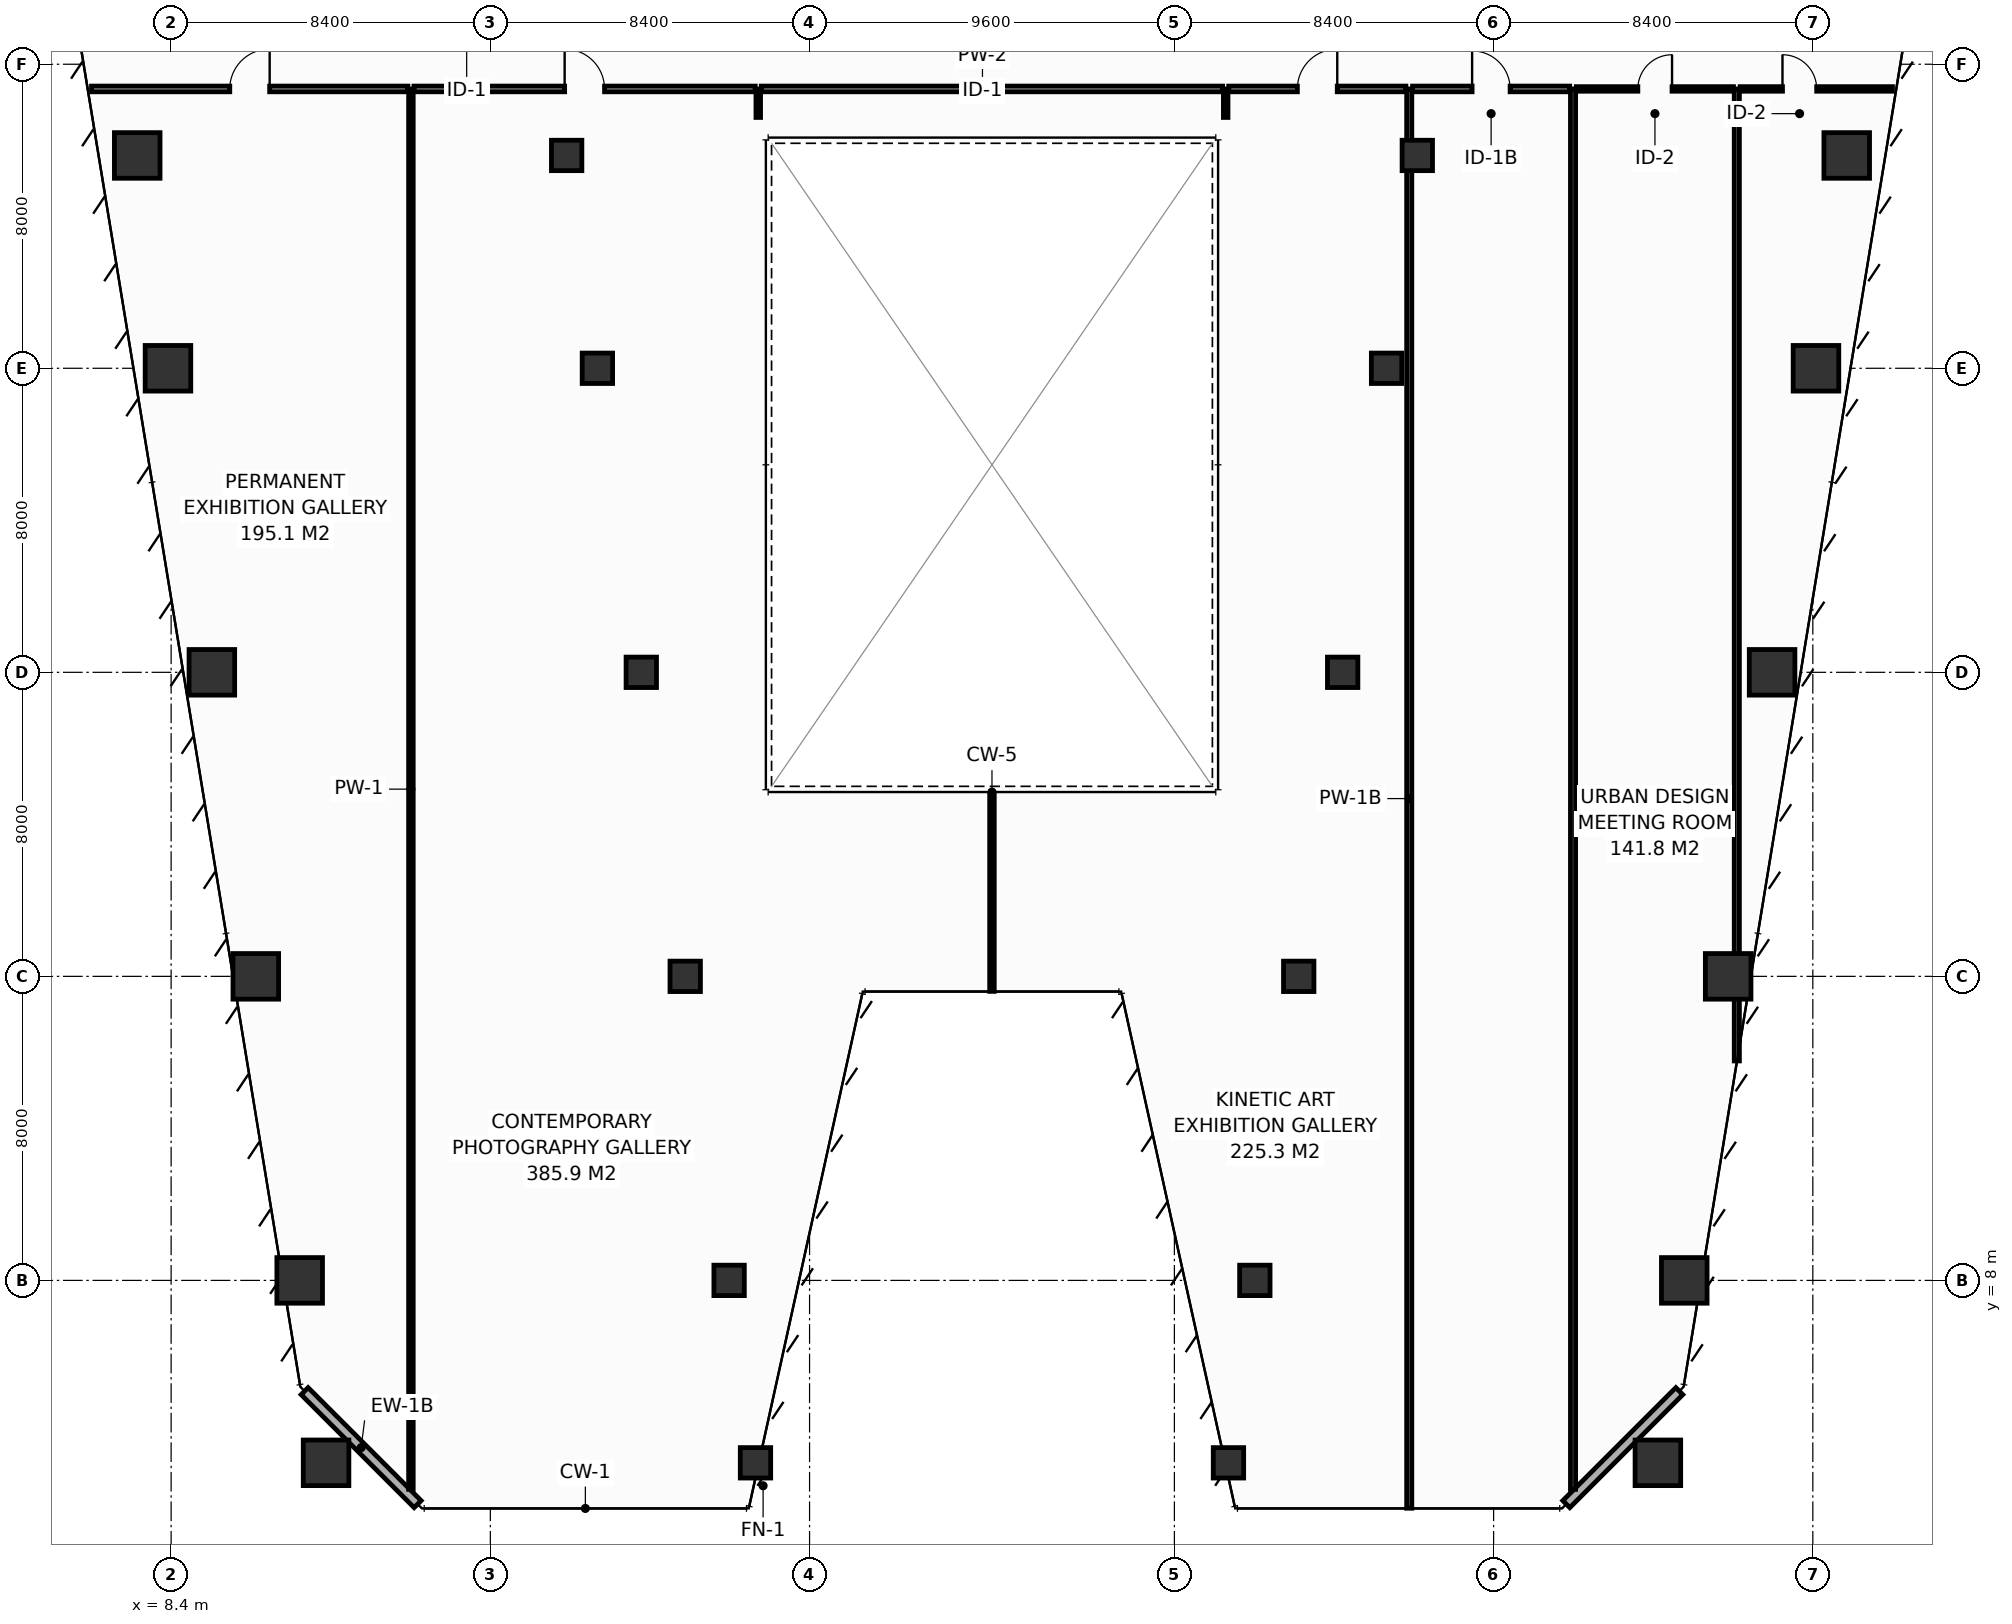
"""IFC4 building model, lengths in metres.
Left out: names, types, materials, properties, quantities, classifications, styles, units other than length and angle.
Written with IfcOpenShell. Run it as: python <this file> out.ifc"""

import sys

from ifc_helpers import new_model, si_unit, direction, frame, frame_2d, origin, origin_2d, place, context, subcontext, project, spatial, rectangle, hollow_rectangle, extrude, element, fill, save


model = new_model("IFC4")
c1 = context("Model", 3, precision=1e-05, world=origin(), true_north=direction((0.0, 1.0)))
c2 = subcontext(c1, "Body", "Model", "MODEL_VIEW")
j1 = project(units=[si_unit("LENGTHUNIT", "METRE"), si_unit("PLANEANGLEUNIT", "RADIAN")], contexts=[c1])
p1 = place(None, origin())
s1 = spatial("IfcSite", under=j1, at=p1, CompositionType="ELEMENT")
p2 = place(p1, origin())
s2 = spatial("IfcBuilding", under=s1, at=p2, CompositionType="ELEMENT")
p3 = place(p2, frame((0.0, 0.0, 60.4)))
s3 = spatial("IfcBuildingStorey", under=s2, at=p3, CompositionType="ELEMENT", Elevation=60.4)
for number, where, z_axis, x_axis in (
    (1, (12.477, 3.2, 0.0), (0.0, 0.0, 1.0), (1.0, 0.0, 0.0)),
    (2, (47.523, 3.2, 0.0), (0.0, 0.0, 1.0), (1.0, 0.0, 0.0)),
):
    element("IfcColumn", number, at=place(p3, frame(where, z_axis=z_axis, x_axis=x_axis)), inside=s3, PredefinedType="COLUMN", context=c2, shape_type="SweptSolid", body=[
        extrude(hollow_rectangle(XDim=1.2, YDim=1.2, WallThickness=0.055, at=origin_2d()), origin(), (0.0, 0.0, 1.0), 4.4),
    ])
for number, where, z_axis, x_axis in (
    (3, (23.777, 3.2, 0.0), (0.0, 0.0, 1.0), (1.0, 0.0, 0.0)),
    (4, (36.223, 3.2, 0.0), (0.0, 0.0, 1.0), (1.0, 0.0, 0.0)),
):
    element("IfcColumn", number, at=place(p3, frame(where, z_axis=z_axis, x_axis=x_axis)), inside=s3, PredefinedType="COLUMN", context=c2, shape_type="SweptSolid", body=[
        extrude(hollow_rectangle(XDim=0.8, YDim=0.8, WallThickness=0.036, at=origin_2d()), origin(), (0.0, 0.0, 1.0), 4.4),
    ])
for number, where, z_axis, x_axis in (
    (5, (11.783, 8.0, 0.0), (0.0, 0.0, 1.0), (1.0, 0.0, 0.0)),
    (6, (48.217, 8.0, 0.0), (0.0, 0.0, 1.0), (1.0, 0.0, 0.0)),
):
    element("IfcColumn", number, at=place(p3, frame(where, z_axis=z_axis, x_axis=x_axis)), inside=s3, PredefinedType="COLUMN", context=c2, shape_type="SweptSolid", body=[
        extrude(hollow_rectangle(XDim=1.2, YDim=1.2, WallThickness=0.055, at=origin_2d()), origin(), (0.0, 0.0, 1.0), 4.4),
    ])
for number, where, z_axis, x_axis in (
    (7, (23.083, 8.0, 0.0), (0.0, 0.0, 1.0), (1.0, 0.0, 0.0)),
    (8, (36.917, 8.0, 0.0), (0.0, 0.0, 1.0), (1.0, 0.0, 0.0)),
):
    element("IfcColumn", number, at=place(p3, frame(where, z_axis=z_axis, x_axis=x_axis)), inside=s3, PredefinedType="COLUMN", context=c2, shape_type="SweptSolid", body=[
        extrude(hollow_rectangle(XDim=0.8, YDim=0.8, WallThickness=0.036, at=origin_2d()), origin(), (0.0, 0.0, 1.0), 4.4),
    ])
for number, where, z_axis, x_axis in (
    (9, (10.628, 16.0, 0.0), (0.0, 0.0, 1.0), (1.0, 0.0, 0.0)),
    (10, (49.372, 16.0, 0.0), (0.0, 0.0, 1.0), (1.0, 0.0, 0.0)),
):
    element("IfcColumn", number, at=place(p3, frame(where, z_axis=z_axis, x_axis=x_axis)), inside=s3, PredefinedType="COLUMN", context=c2, shape_type="SweptSolid", body=[
        extrude(hollow_rectangle(XDim=1.2, YDim=1.2, WallThickness=0.055, at=origin_2d()), origin(), (0.0, 0.0, 1.0), 4.4),
    ])
for number, where, z_axis, x_axis in (
    (11, (21.928, 16.0, 0.0), (0.0, 0.0, 1.0), (1.0, 0.0, 0.0)),
    (12, (38.072, 16.0, 0.0), (0.0, 0.0, 1.0), (1.0, 0.0, 0.0)),
):
    element("IfcColumn", number, at=place(p3, frame(where, z_axis=z_axis, x_axis=x_axis)), inside=s3, PredefinedType="COLUMN", context=c2, shape_type="SweptSolid", body=[
        extrude(hollow_rectangle(XDim=0.8, YDim=0.8, WallThickness=0.036, at=origin_2d()), origin(), (0.0, 0.0, 1.0), 4.4),
    ])
for number, where, z_axis, x_axis in (
    (13, (9.472, 24.0, 0.0), (0.0, 0.0, 1.0), (1.0, 0.0, 0.0)),
    (14, (50.528, 24.0, 0.0), (0.0, 0.0, 1.0), (1.0, 0.0, 0.0)),
):
    element("IfcColumn", number, at=place(p3, frame(where, z_axis=z_axis, x_axis=x_axis)), inside=s3, PredefinedType="COLUMN", context=c2, shape_type="SweptSolid", body=[
        extrude(hollow_rectangle(XDim=1.2, YDim=1.2, WallThickness=0.055, at=origin_2d()), origin(), (0.0, 0.0, 1.0), 4.4),
    ])
for number, where, z_axis, x_axis in (
    (15, (20.772, 24.0, 0.0), (0.0, 0.0, 1.0), (1.0, 0.0, 0.0)),
    (16, (39.228, 24.0, 0.0), (0.0, 0.0, 1.0), (1.0, 0.0, 0.0)),
):
    element("IfcColumn", number, at=place(p3, frame(where, z_axis=z_axis, x_axis=x_axis)), inside=s3, PredefinedType="COLUMN", context=c2, shape_type="SweptSolid", body=[
        extrude(hollow_rectangle(XDim=0.8, YDim=0.8, WallThickness=0.036, at=origin_2d()), origin(), (0.0, 0.0, 1.0), 4.4),
    ])
for number, where, z_axis, x_axis in (
    (17, (8.317, 32.0, 0.0), (0.0, 0.0, 1.0), (1.0, 0.0, 0.0)),
    (18, (51.683, 32.0, 0.0), (0.0, 0.0, 1.0), (1.0, 0.0, 0.0)),
):
    element("IfcColumn", number, at=place(p3, frame(where, z_axis=z_axis, x_axis=x_axis)), inside=s3, PredefinedType="COLUMN", context=c2, shape_type="SweptSolid", body=[
        extrude(hollow_rectangle(XDim=1.2, YDim=1.2, WallThickness=0.055, at=origin_2d()), origin(), (0.0, 0.0, 1.0), 4.4),
    ])
for number, where, z_axis, x_axis in (
    (19, (19.617, 32.0, 0.0), (0.0, 0.0, 1.0), (1.0, 0.0, 0.0)),
    (20, (40.383, 32.0, 0.0), (0.0, 0.0, 1.0), (1.0, 0.0, 0.0)),
):
    element("IfcColumn", number, at=place(p3, frame(where, z_axis=z_axis, x_axis=x_axis)), inside=s3, PredefinedType="COLUMN", context=c2, shape_type="SweptSolid", body=[
        extrude(hollow_rectangle(XDim=0.8, YDim=0.8, WallThickness=0.036, at=origin_2d()), origin(), (0.0, 0.0, 1.0), 4.4),
    ])
for number, where, z_axis, x_axis in (
    (21, (7.508, 37.6, 0.0), (0.0, 0.0, 1.0), (1.0, 0.0, 0.0)),
    (22, (52.492, 37.6, 0.0), (0.0, 0.0, 1.0), (1.0, 0.0, 0.0)),
):
    element("IfcColumn", number, at=place(p3, frame(where, z_axis=z_axis, x_axis=x_axis)), inside=s3, PredefinedType="COLUMN", context=c2, shape_type="SweptSolid", body=[
        extrude(hollow_rectangle(XDim=1.2, YDim=1.2, WallThickness=0.055, at=origin_2d()), origin(), (0.0, 0.0, 1.0), 4.4),
    ])
for number, where, z_axis, x_axis in (
    (23, (18.808, 37.6, 0.0), (0.0, 0.0, 1.0), (1.0, 0.0, 0.0)),
    (24, (41.192, 37.6, 0.0), (0.0, 0.0, 1.0), (1.0, 0.0, 0.0)),
):
    element("IfcColumn", number, at=place(p3, frame(where, z_axis=z_axis, x_axis=x_axis)), inside=s3, PredefinedType="COLUMN", context=c2, shape_type="SweptSolid", body=[
        extrude(hollow_rectangle(XDim=0.8, YDim=0.8, WallThickness=0.036, at=origin_2d()), origin(), (0.0, 0.0, 1.0), 4.4),
    ])
for number, where, z_axis, x_axis in (
    (25, (11.913, 5.087, 0.0), (0.0, 0.0, 1.0), (0.707, -0.707, 0.0)),
    (26, (45.113, 2.113, 0.0), (0.0, 0.0, 1.0), (0.707, 0.707, 0.0)),
):
    element("IfcWall", number, at=place(p3, frame(where, z_axis=z_axis, x_axis=x_axis)), inside=s3, PredefinedType="STANDARD", context=c2, shape_type="SweptSolid", body=[
        extrude(rectangle(XDim=4.206, YDim=0.26, at=frame_2d((2.103, 0.0))), origin(), (0.0, 0.0, 1.0), 4.15),
    ])
p4 = place(p3, frame((14.71, 2.502, 0.0), z_axis=(0.0, 0.0, 1.0), x_axis=(0.0, 1.0, 0.0)))
e27 = element("IfcWall", 27, at=p4, inside=s3, PredefinedType="PARTITIONING", context=c2, shape_type="SweptSolid", body=[
    extrude(rectangle(XDim=36.848, YDim=0.12, at=frame_2d((18.424, 0.0))), origin(), (0.0, 0.0, 1.0), 3.335),
])
p5 = place(p3, frame((40.98, 2.005, 0.0), z_axis=(0.0, 0.0, 1.0), x_axis=(0.0, 1.0, 0.0)))
e28 = element("IfcWall", 28, at=p5, inside=s3, PredefinedType="PARTITIONING", context=c2, shape_type="SweptSolid", body=[
    extrude(rectangle(XDim=37.345, YDim=0.135, at=frame_2d((18.673, 0.0))), origin(), (0.0, 0.0, 1.0), 3.335),
])
p6 = place(p3, frame((45.29, 2.502, 0.0), z_axis=(0.0, 0.0, 1.0), x_axis=(0.0, 1.0, 0.0)))
e29 = element("IfcWall", 29, at=p6, inside=s3, PredefinedType="PARTITIONING", context=c2, shape_type="SweptSolid", body=[
    extrude(rectangle(XDim=36.848, YDim=0.135, at=frame_2d((18.424, 0.0))), origin(), (0.0, 0.0, 1.0), 3.335),
])
p7 = place(p3, frame((49.6, 13.774, 0.0), z_axis=(0.0, 0.0, 1.0), x_axis=(0.0, 1.0, 0.0)))
e30 = element("IfcWall", 30, at=p7, inside=s3, PredefinedType="PARTITIONING", context=c2, shape_type="SweptSolid", body=[
    extrude(rectangle(XDim=25.576, YDim=0.135, at=frame_2d((12.788, 0.0))), origin(), (0.0, 0.0, 1.0), 3.335),
])
for number, where, z_axis, x_axis in (
    (31, (23.85, 38.6, 0.0), (0.0, 0.0, 1.0), (0.0, 1.0, 0.0)),
    (32, (36.15, 38.6, 0.0), (0.0, 0.0, 1.0), (0.0, 1.0, 0.0)),
):
    element("IfcWall", number, at=place(p3, frame(where, z_axis=z_axis, x_axis=x_axis)), inside=s3, PredefinedType="PARTITIONING", context=c2, shape_type="SweptSolid", body=[
        extrude(rectangle(XDim=0.75, YDim=0.12, at=frame_2d((0.375, 0.0))), origin(), (0.0, 0.0, 1.0), 4.15),
    ])
p8 = place(p3, frame((30.0, 15.605, 0.0), z_axis=(0.0, 0.0, 1.0), x_axis=(0.0, 1.0, 0.0)))
e33 = element("IfcWall", 33, at=p8, inside=s3, PredefinedType="PARTITIONING", context=c2, shape_type="SweptSolid", body=[
    extrude(rectangle(XDim=5.175, YDim=0.12, at=frame_2d((2.587, 0.0))), origin(), (0.0, 0.0, 1.0), 4.15),
])
p9 = place(p3, frame((6.305, 39.35, 0.0), z_axis=(0.0, 0.0, 1.0), x_axis=(1.0, 0.0, 0.0)))
e34 = element("IfcWall", 34, at=p9, inside=s3, PredefinedType="PARTITIONING", context=c2, shape_type="SweptSolid", body=[
    extrude(rectangle(XDim=8.325, YDim=0.15, at=frame_2d((4.163, 0.0))), origin(), (0.0, 0.0, 1.0), 3.635),
])
p10 = place(p9, frame((3.638, 0.0, 0.0)))
e35 = element("IfcOpeningElement", 35, at=p10, cuts=e34, PredefinedType="OPENING", context=c2, shape_type="SweptSolid", body=[
    extrude(rectangle(XDim=1.05, YDim=2.15, at=frame_2d((0.525, 1.075))), frame((0.0, 0.085, 0.0), z_axis=(0.0, -1.0, 0.0), x_axis=(1.0, 0.0, 0.0)), (0.0, 0.0, 1.0), 0.17),
])
p11 = place(p3, frame((14.79, 39.35, 0.0), z_axis=(0.0, 0.0, 1.0), x_axis=(1.0, 0.0, 0.0)))
e36 = element("IfcWall", 36, at=p11, inside=s3, PredefinedType="PARTITIONING", context=c2, shape_type="SweptSolid", body=[
    extrude(rectangle(XDim=8.98, YDim=0.15, at=frame_2d((4.49, 0.0))), origin(), (0.0, 0.0, 1.0), 3.335),
])
p12 = place(p11, frame((3.965, 0.0, 0.0)))
e37 = element("IfcOpeningElement", 37, at=p12, cuts=e36, PredefinedType="OPENING", context=c2, shape_type="SweptSolid", body=[
    extrude(rectangle(XDim=1.05, YDim=2.15, at=frame_2d((0.525, 1.075))), frame((0.0, 0.085, 0.0), z_axis=(0.0, -1.0, 0.0), x_axis=(1.0, 0.0, 0.0)), (0.0, 0.0, 1.0), 0.17),
])
p13 = place(p3, frame((23.93, 39.35, 0.0), z_axis=(0.0, 0.0, 1.0), x_axis=(1.0, 0.0, 0.0)))
e38 = element("IfcWall", 38, at=p13, inside=s3, PredefinedType="PARTITIONING", context=c2, shape_type="SweptSolid", body=[
    extrude(rectangle(XDim=12.14, YDim=0.15, at=frame_2d((6.07, 0.0))), origin(), (0.0, 0.0, 1.0), 4.15),
])
p14 = place(p3, frame((36.23, 39.35, 0.0), z_axis=(0.0, 0.0, 1.0), x_axis=(1.0, 0.0, 0.0)))
e39 = element("IfcWall", 39, at=p14, inside=s3, PredefinedType="PARTITIONING", context=c2, shape_type="SweptSolid", body=[
    extrude(rectangle(XDim=4.663, YDim=0.15, at=frame_2d((2.331, 0.0))), origin(), (0.0, 0.0, 1.0), 3.335),
])
p15 = place(p14, frame((1.806, 0.0, 0.0)))
e40 = element("IfcOpeningElement", 40, at=p15, cuts=e39, PredefinedType="OPENING", context=c2, shape_type="SweptSolid", body=[
    extrude(rectangle(XDim=1.05, YDim=2.15, at=frame_2d((0.525, 1.075))), frame((0.0, 0.085, 0.0), z_axis=(0.0, -1.0, 0.0), x_axis=(1.0, 0.0, 0.0)), (0.0, 0.0, 1.0), 0.17),
])
p16 = place(p3, frame((41.067, 39.35, 0.0), z_axis=(0.0, 0.0, 1.0), x_axis=(1.0, 0.0, 0.0)))
e41 = element("IfcWall", 41, at=p16, inside=s3, PredefinedType="PARTITIONING", context=c2, shape_type="SweptSolid", body=[
    extrude(rectangle(XDim=4.135, YDim=0.15, at=frame_2d((2.067, 0.0))), origin(), (0.0, 0.0, 1.0), 4.15),
])
p17 = place(p16, frame((1.567, 0.0, 0.0)))
e42 = element("IfcOpeningElement", 42, at=p17, cuts=e41, PredefinedType="OPENING", context=c2, shape_type="SweptSolid", body=[
    extrude(rectangle(XDim=1.0, YDim=2.15, at=frame_2d((0.5, 1.075))), frame((0.0, 0.085, 0.0), z_axis=(0.0, -1.0, 0.0), x_axis=(1.0, 0.0, 0.0)), (0.0, 0.0, 1.0), 0.17),
])
p18 = place(p3, frame((45.377, 39.35, 0.0), z_axis=(0.0, 0.0, 1.0), x_axis=(1.0, 0.0, 0.0)))
e43 = element("IfcWall", 43, at=p18, inside=s3, PredefinedType="PARTITIONING", context=c2, shape_type="SweptSolid", body=[
    extrude(rectangle(XDim=4.135, YDim=0.12, at=frame_2d((2.067, 0.0))), origin(), (0.0, 0.0, 1.0), 4.15),
])
p19 = place(p18, frame((1.618, 0.0, 0.0)))
e44 = element("IfcOpeningElement", 44, at=p19, cuts=e43, PredefinedType="OPENING", context=c2, shape_type="SweptSolid", body=[
    extrude(rectangle(XDim=0.9, YDim=2.1, at=frame_2d((0.45, 1.05))), frame((0.0, 0.07, 0.0), z_axis=(0.0, -1.0, 0.0), x_axis=(1.0, 0.0, 0.0)), (0.0, 0.0, 1.0), 0.14),
])
p20 = place(p3, frame((49.688, 39.35, 0.0), z_axis=(0.0, 0.0, 1.0), x_axis=(1.0, 0.0, 0.0)))
e45 = element("IfcWall", 45, at=p20, inside=s3, PredefinedType="PARTITIONING", context=c2, shape_type="SweptSolid", body=[
    extrude(rectangle(XDim=4.008, YDim=0.12, at=frame_2d((2.004, 0.0))), origin(), (0.0, 0.0, 1.0), 3.635),
])
p21 = place(p20, frame((1.114, 0.0, 0.0)))
e46 = element("IfcOpeningElement", 46, at=p21, cuts=e45, PredefinedType="OPENING", context=c2, shape_type="SweptSolid", body=[
    extrude(rectangle(XDim=0.9, YDim=2.1, at=frame_2d((0.45, 1.05))), frame((0.0, 0.07, 0.0), z_axis=(0.0, -1.0, 0.0), x_axis=(1.0, 0.0, 0.0)), (0.0, 0.0, 1.0), 0.14),
])
p22 = place(p10, origin())
e47 = element("IfcDoor", 47, at=p22, inside=s3, OperationType="SINGLE_SWING_RIGHT", PredefinedType="DOOR", context=c2, shape_type="SweptSolid", body=[
    extrude(rectangle(XDim=1.05, YDim=2.15, at=frame_2d((0.525, 1.075))), frame((0.0, 0.025, 0.0), z_axis=(0.0, -1.0, 0.0), x_axis=(1.0, 0.0, 0.0)), (0.0, 0.0, 1.0), 0.05),
])
fill(e35, e47)
p23 = place(p12, origin())
e48 = element("IfcDoor", 48, at=p23, inside=s3, OperationType="SINGLE_SWING_LEFT", PredefinedType="DOOR", context=c2, shape_type="SweptSolid", body=[
    extrude(rectangle(XDim=1.05, YDim=2.15, at=frame_2d((0.525, 1.075))), frame((0.0, 0.025, 0.0), z_axis=(0.0, -1.0, 0.0), x_axis=(1.0, 0.0, 0.0)), (0.0, 0.0, 1.0), 0.05),
])
fill(e37, e48)
p24 = place(p15, origin())
e49 = element("IfcDoor", 49, at=p24, inside=s3, OperationType="SINGLE_SWING_RIGHT", PredefinedType="DOOR", context=c2, shape_type="SweptSolid", body=[
    extrude(rectangle(XDim=1.05, YDim=2.15, at=frame_2d((0.525, 1.075))), frame((0.0, 0.025, 0.0), z_axis=(0.0, -1.0, 0.0), x_axis=(1.0, 0.0, 0.0)), (0.0, 0.0, 1.0), 0.05),
])
fill(e40, e49)
p25 = place(p17, origin())
e50 = element("IfcDoor", 50, at=p25, inside=s3, OperationType="SINGLE_SWING_LEFT", PredefinedType="DOOR", context=c2, shape_type="SweptSolid", body=[
    extrude(rectangle(XDim=1.0, YDim=2.15, at=frame_2d((0.5, 1.075))), frame((0.0, 0.025, 0.0), z_axis=(0.0, -1.0, 0.0), x_axis=(1.0, 0.0, 0.0)), (0.0, 0.0, 1.0), 0.05),
])
fill(e42, e50)
p26 = place(p19, origin())
e51 = element("IfcDoor", 51, at=p26, inside=s3, OperationType="SINGLE_SWING_RIGHT", PredefinedType="DOOR", context=c2, shape_type="SweptSolid", body=[
    extrude(rectangle(XDim=0.9, YDim=2.1, at=frame_2d((0.45, 1.05))), frame((0.0, 0.025, 0.0), z_axis=(0.0, -1.0, 0.0), x_axis=(1.0, 0.0, 0.0)), (0.0, 0.0, 1.0), 0.05),
])
fill(e44, e51)
p27 = place(p21, origin())
e52 = element("IfcDoor", 52, at=p27, inside=s3, OperationType="SINGLE_SWING_LEFT", PredefinedType="DOOR", context=c2, shape_type="SweptSolid", body=[
    extrude(rectangle(XDim=0.9, YDim=2.1, at=frame_2d((0.45, 1.05))), frame((0.0, 0.025, 0.0), z_axis=(0.0, -1.0, 0.0), x_axis=(1.0, 0.0, 0.0)), (0.0, 0.0, 1.0), 0.05),
])
fill(e46, e52)
save(model, sys.argv[1])
